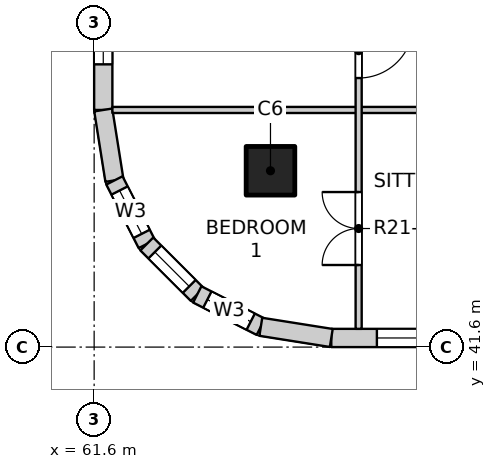
"""IFC4 building model, lengths in metres.
Left out: names, types, materials, properties, quantities, classifications, styles, units other than length and angle.
Written with IfcOpenShell. Run it as: python <this file> out.ifc"""

import sys

from ifc_helpers import new_model, si_unit, direction, frame, frame_2d, origin, origin_2d, place, context, subcontext, project, spatial, rectangle, extrude, element, fill, save


model = new_model("IFC4")
c1 = context("Model", 3, precision=1e-05, world=origin(), true_north=direction((0.0, 1.0)))
c2 = subcontext(c1, "Body", "Model", "MODEL_VIEW")
j1 = project(units=[si_unit("LENGTHUNIT", "METRE"), si_unit("PLANEANGLEUNIT", "RADIAN")], contexts=[c1])
p1 = place(None, origin())
s1 = spatial("IfcSite", under=j1, at=p1, CompositionType="ELEMENT")
p2 = place(p1, origin())
s2 = spatial("IfcBuilding", under=s1, at=p2, CompositionType="ELEMENT")
p3 = place(p2, frame((0.0, 0.0, 221.1)))
s3 = spatial("IfcBuildingStorey", under=s2, at=p3, CompositionType="ELEMENT", Elevation=221.1)
p4 = place(p3, frame((64.5, 44.5, -0.25), z_axis=(0.0, 0.0, 1.0), x_axis=(1.0, 0.0, 0.0)))
e1 = element("IfcColumn", 1, at=p4, inside=s3, PredefinedType="COLUMN", context=c2, shape_type="SweptSolid", body=[
    extrude(rectangle(XDim=0.8, YDim=0.8, at=origin_2d()), origin(), (0.0, 0.0, 1.0), 3.4),
])
p5 = place(p3, frame((65.5, 41.75, 0.0), z_axis=(0.0, 0.0, 1.0), x_axis=(1.0, 0.0, 0.0)))
e2 = element("IfcWall", 2, at=p5, inside=s3, PredefinedType="SOLIDWALL", context=c2, shape_type="SweptSolid", body=[
    extrude(rectangle(XDim=7.4, YDim=0.3, at=frame_2d((3.7, 0.0))), origin(), (0.0, 0.0, 1.0), 2.7),
])
p6 = place(p5, frame((0.75, 0.0, 0.9)))
e3 = element("IfcOpeningElement", 3, at=p6, cuts=e2, PredefinedType="OPENING", context=c2, shape_type="SweptSolid", body=[
    extrude(rectangle(XDim=2.4, YDim=1.8, at=frame_2d((1.2, 0.9))), frame((0.0, 0.16, 0.0), z_axis=(0.0, -1.0, 0.0), x_axis=(1.0, 0.0, 0.0)), (0.0, 0.0, 1.0), 0.32),
])
p7 = place(p5, frame((4.65, 0.0, 0.9)))
e4 = element("IfcOpeningElement", 4, at=p7, cuts=e2, PredefinedType="OPENING", context=c2, shape_type="SweptSolid", body=[
    extrude(rectangle(XDim=2.4, YDim=1.8, at=frame_2d((1.2, 0.9))), frame((0.0, 0.16, 0.0), z_axis=(0.0, -1.0, 0.0), x_axis=(1.0, 0.0, 0.0)), (0.0, 0.0, 1.0), 0.32),
])
p8 = place(p3, frame((61.75, 45.5, 0.0), z_axis=(0.0, 0.0, 1.0), x_axis=(0.0, 1.0, 0.0)))
e5 = element("IfcWall", 5, at=p8, inside=s3, PredefinedType="SOLIDWALL", context=c2, shape_type="SweptSolid", body=[
    extrude(rectangle(XDim=7.4, YDim=0.3, at=frame_2d((3.7, 0.0))), origin(), (0.0, 0.0, 1.0), 2.7),
])
p9 = place(p8, frame((0.75, 0.0, 0.9)))
e6 = element("IfcOpeningElement", 6, at=p9, cuts=e5, PredefinedType="OPENING", context=c2, shape_type="SweptSolid", body=[
    extrude(rectangle(XDim=2.4, YDim=1.8, at=frame_2d((1.2, 0.9))), frame((0.0, 0.16, 0.0), z_axis=(0.0, -1.0, 0.0), x_axis=(1.0, 0.0, 0.0)), (0.0, 0.0, 1.0), 0.32),
])
p10 = place(p8, frame((4.65, 0.0, 0.9)))
e7 = element("IfcOpeningElement", 7, at=p10, cuts=e5, PredefinedType="OPENING", context=c2, shape_type="SweptSolid", body=[
    extrude(rectangle(XDim=2.4, YDim=1.8, at=frame_2d((1.2, 0.9))), frame((0.0, 0.16, 0.0), z_axis=(0.0, -1.0, 0.0), x_axis=(1.0, 0.0, 0.0)), (0.0, 0.0, 1.0), 0.32),
])
p11 = place(p3, frame((61.75, 45.5, 0.0), z_axis=(0.0, 0.0, 1.0), x_axis=(0.156496880861, -0.987678452879, 0.0)))
e8 = element("IfcWall", 8, at=p11, inside=s3, PredefinedType="SOLIDWALL", context=c2, shape_type="SweptSolid", body=[
    extrude(rectangle(XDim=1.173, YDim=0.3, at=frame_2d((0.586, 0.0))), origin(), (0.0, 0.0, 1.0), 2.7),
])
p12 = place(p3, frame((61.934, 44.341, 0.0), z_axis=(0.0, 0.0, 1.0), x_axis=(0.454025524128, -0.890988677504, 0.0)))
e9 = element("IfcWall", 9, at=p12, inside=s3, PredefinedType="SOLIDWALL", context=c2, shape_type="SweptSolid", body=[
    extrude(rectangle(XDim=1.173, YDim=0.3, at=frame_2d((0.587, 0.0))), origin(), (0.0, 0.0, 1.0), 2.7),
])
p13 = place(p12, frame((0.187, 0.0, 0.9)))
e10 = element("IfcOpeningElement", 10, at=p13, cuts=e9, PredefinedType="OPENING", context=c2, shape_type="SweptSolid", body=[
    extrude(rectangle(XDim=0.8, YDim=1.2, at=frame_2d((0.4, 0.6))), frame((0.0, 0.16, 0.0), z_axis=(0.0, -1.0, 0.0), x_axis=(1.0, 0.0, 0.0)), (0.0, 0.0, 1.0), 0.32),
])
p14 = place(p3, frame((62.466, 43.296, 0.0), z_axis=(0.0, 0.0, 1.0), x_axis=(0.707106781187, -0.707106781187, 0.0)))
e11 = element("IfcWall", 11, at=p14, inside=s3, PredefinedType="SOLIDWALL", context=c2, shape_type="SweptSolid", body=[
    extrude(rectangle(XDim=1.173, YDim=0.3, at=frame_2d((0.586, 0.0))), origin(), (0.0, 0.0, 1.0), 2.7),
])
p15 = place(p14, frame((0.187, 0.0, 0.9)))
e12 = element("IfcOpeningElement", 12, at=p15, cuts=e11, PredefinedType="OPENING", context=c2, shape_type="SweptSolid", body=[
    extrude(rectangle(XDim=0.8, YDim=1.2, at=frame_2d((0.4, 0.6))), frame((0.0, 0.16, 0.0), z_axis=(0.0, -1.0, 0.0), x_axis=(1.0, 0.0, 0.0)), (0.0, 0.0, 1.0), 0.32),
])
p16 = place(p3, frame((63.296, 42.466, 0.0), z_axis=(0.0, 0.0, 1.0), x_axis=(0.890988677504, -0.454025524128, 0.0)))
e13 = element("IfcWall", 13, at=p16, inside=s3, PredefinedType="SOLIDWALL", context=c2, shape_type="SweptSolid", body=[
    extrude(rectangle(XDim=1.173, YDim=0.3, at=frame_2d((0.587, 0.0))), origin(), (0.0, 0.0, 1.0), 2.7),
])
p17 = place(p16, frame((0.187, 0.0, 0.9)))
e14 = element("IfcOpeningElement", 14, at=p17, cuts=e13, PredefinedType="OPENING", context=c2, shape_type="SweptSolid", body=[
    extrude(rectangle(XDim=0.8, YDim=1.2, at=frame_2d((0.4, 0.6))), frame((0.0, 0.16, 0.0), z_axis=(0.0, -1.0, 0.0), x_axis=(1.0, 0.0, 0.0)), (0.0, 0.0, 1.0), 0.32),
])
p18 = place(p3, frame((64.341, 41.934, 0.0), z_axis=(0.0, 0.0, 1.0), x_axis=(0.987678452879, -0.156496880861, 0.0)))
e15 = element("IfcWall", 15, at=p18, inside=s3, PredefinedType="SOLIDWALL", context=c2, shape_type="SweptSolid", body=[
    extrude(rectangle(XDim=1.173, YDim=0.3, at=frame_2d((0.586, 0.0))), origin(), (0.0, 0.0, 1.0), 2.7),
])
p19 = place(p3, frame((61.9, 45.5, 0.0), z_axis=(0.0, 0.0, 1.0), x_axis=(1.0, 0.0, 0.0)))
e16 = element("IfcWall", 16, at=p19, inside=s3, PredefinedType="PARTITIONING", context=c2, shape_type="SweptSolid", body=[
    extrude(rectangle(XDim=11.475, YDim=0.1, at=frame_2d((5.737, 0.0))), origin(), (0.0, 0.0, 1.0), 3.15),
])
p20 = place(p19, frame((7.965, 0.0, 0.0)))
e17 = element("IfcOpeningElement", 17, at=p20, cuts=e16, PredefinedType="OPENING", context=c2, shape_type="SweptSolid", body=[
    extrude(rectangle(XDim=0.9, YDim=2.1, at=frame_2d((0.45, 1.05))), frame((0.0, 0.06, 0.0), z_axis=(0.0, -1.0, 0.0), x_axis=(1.0, 0.0, 0.0)), (0.0, 0.0, 1.0), 0.12),
])
p21 = place(p3, frame((65.95, 41.9, 0.0), z_axis=(0.0, 0.0, 1.0), x_axis=(0.0, 1.0, 0.0)))
e18 = element("IfcWall", 18, at=p21, inside=s3, PredefinedType="PARTITIONING", context=c2, shape_type="SweptSolid", body=[
    extrude(rectangle(XDim=19.1, YDim=0.1, at=frame_2d((9.55, 0.0))), origin(), (0.0, 0.0, 1.0), 3.15),
])
p22 = place(p21, frame((1.05, 0.0, 0.0)))
e19 = element("IfcOpeningElement", 19, at=p22, cuts=e18, PredefinedType="OPENING", context=c2, shape_type="SweptSolid", body=[
    extrude(rectangle(XDim=1.2, YDim=2.1, at=frame_2d((0.6, 1.05))), frame((0.0, 0.06, 0.0), z_axis=(0.0, -1.0, 0.0), x_axis=(1.0, 0.0, 0.0)), (0.0, 0.0, 1.0), 0.12),
])
p23 = place(p21, frame((4.125, 0.0, 0.0)))
e20 = element("IfcOpeningElement", 20, at=p23, cuts=e18, PredefinedType="OPENING", context=c2, shape_type="SweptSolid", body=[
    extrude(rectangle(XDim=0.9, YDim=2.1, at=frame_2d((0.45, 1.05))), frame((0.0, 0.06, 0.0), z_axis=(0.0, -1.0, 0.0), x_axis=(1.0, 0.0, 0.0)), (0.0, 0.0, 1.0), 0.12),
])
p24 = place(p21, frame((6.075, 0.0, 0.0)))
e21 = element("IfcOpeningElement", 21, at=p24, cuts=e18, PredefinedType="OPENING", context=c2, shape_type="SweptSolid", body=[
    extrude(rectangle(XDim=0.9, YDim=2.1, at=frame_2d((0.45, 1.05))), frame((0.0, 0.06, 0.0), z_axis=(0.0, -1.0, 0.0), x_axis=(1.0, 0.0, 0.0)), (0.0, 0.0, 1.0), 0.12),
])
p25 = place(p21, frame((8.85, 0.0, 0.0)))
e22 = element("IfcOpeningElement", 22, at=p25, cuts=e18, PredefinedType="OPENING", context=c2, shape_type="SweptSolid", body=[
    extrude(rectangle(XDim=1.2, YDim=2.1, at=frame_2d((0.6, 1.05))), frame((0.0, 0.06, 0.0), z_axis=(0.0, -1.0, 0.0), x_axis=(1.0, 0.0, 0.0)), (0.0, 0.0, 1.0), 0.12),
])
p26 = place(p21, frame((12.75, 0.0, 0.0)))
e23 = element("IfcOpeningElement", 23, at=p26, cuts=e18, PredefinedType="OPENING", context=c2, shape_type="SweptSolid", body=[
    extrude(rectangle(XDim=1.2, YDim=2.1, at=frame_2d((0.6, 1.05))), frame((0.0, 0.06, 0.0), z_axis=(0.0, -1.0, 0.0), x_axis=(1.0, 0.0, 0.0)), (0.0, 0.0, 1.0), 0.12),
])
p27 = place(p21, frame((15.825, 0.0, 0.0)))
e24 = element("IfcOpeningElement", 24, at=p27, cuts=e18, PredefinedType="OPENING", context=c2, shape_type="SweptSolid", body=[
    extrude(rectangle(XDim=0.9, YDim=2.1, at=frame_2d((0.45, 1.05))), frame((0.0, 0.06, 0.0), z_axis=(0.0, -1.0, 0.0), x_axis=(1.0, 0.0, 0.0)), (0.0, 0.0, 1.0), 0.12),
])
p28 = place(p21, frame((17.775, 0.0, 0.0)))
e25 = element("IfcOpeningElement", 25, at=p28, cuts=e18, PredefinedType="OPENING", context=c2, shape_type="SweptSolid", body=[
    extrude(rectangle(XDim=0.9, YDim=2.1, at=frame_2d((0.45, 1.05))), frame((0.0, 0.06, 0.0), z_axis=(0.0, -1.0, 0.0), x_axis=(1.0, 0.0, 0.0)), (0.0, 0.0, 1.0), 0.12),
])
p29 = place(p6, origin())
e26 = element("IfcWindow", 26, at=p29, inside=s3, PartitioningType="DOUBLE_PANEL_VERTICAL", PredefinedType="WINDOW", context=c2, shape_type="SweptSolid", body=[
    extrude(rectangle(XDim=2.4, YDim=1.8, at=frame_2d((1.2, 0.9))), frame((0.0, 0.03, 0.0), z_axis=(0.0, -1.0, 0.0), x_axis=(1.0, 0.0, 0.0)), (0.0, 0.0, 1.0), 0.06),
])
fill(e3, e26)
p30 = place(p9, origin())
e27 = element("IfcWindow", 27, at=p30, inside=s3, PartitioningType="DOUBLE_PANEL_VERTICAL", PredefinedType="WINDOW", context=c2, shape_type="SweptSolid", body=[
    extrude(rectangle(XDim=2.4, YDim=1.8, at=frame_2d((1.2, 0.9))), frame((0.0, 0.03, 0.0), z_axis=(0.0, -1.0, 0.0), x_axis=(1.0, 0.0, 0.0)), (0.0, 0.0, 1.0), 0.06),
])
fill(e6, e27)
p31 = place(p13, origin())
e28 = element("IfcWindow", 28, at=p31, inside=s3, PartitioningType="SINGLE_PANEL", PredefinedType="WINDOW", context=c2, shape_type="SweptSolid", body=[
    extrude(rectangle(XDim=0.8, YDim=1.2, at=frame_2d((0.4, 0.6))), frame((0.0, 0.03, 0.0), z_axis=(0.0, -1.0, 0.0), x_axis=(1.0, 0.0, 0.0)), (0.0, 0.0, 1.0), 0.06),
])
fill(e10, e28)
p32 = place(p15, origin())
e29 = element("IfcWindow", 29, at=p32, inside=s3, PartitioningType="SINGLE_PANEL", PredefinedType="WINDOW", context=c2, shape_type="SweptSolid", body=[
    extrude(rectangle(XDim=0.8, YDim=1.2, at=frame_2d((0.4, 0.6))), frame((0.0, 0.03, 0.0), z_axis=(0.0, -1.0, 0.0), x_axis=(1.0, 0.0, 0.0)), (0.0, 0.0, 1.0), 0.06),
])
fill(e12, e29)
p33 = place(p17, origin())
e30 = element("IfcWindow", 30, at=p33, inside=s3, PartitioningType="SINGLE_PANEL", PredefinedType="WINDOW", context=c2, shape_type="SweptSolid", body=[
    extrude(rectangle(XDim=0.8, YDim=1.2, at=frame_2d((0.4, 0.6))), frame((0.0, 0.03, 0.0), z_axis=(0.0, -1.0, 0.0), x_axis=(1.0, 0.0, 0.0)), (0.0, 0.0, 1.0), 0.06),
])
fill(e14, e30)
p34 = place(p22, origin())
e31 = element("IfcDoor", 31, at=p34, inside=s3, OperationType="DOUBLE_DOOR_SINGLE_SWING", PredefinedType="DOOR", context=c2, shape_type="SweptSolid", body=[
    extrude(rectangle(XDim=1.2, YDim=2.1, at=frame_2d((0.6, 1.05))), frame((0.0, 0.025, 0.0), z_axis=(0.0, -1.0, 0.0), x_axis=(1.0, 0.0, 0.0)), (0.0, 0.0, 1.0), 0.05),
])
fill(e19, e31)
p35 = place(p23, origin())
e32 = element("IfcDoor", 32, at=p35, inside=s3, OperationType="SINGLE_SWING_LEFT", PredefinedType="DOOR", context=c2, shape_type="SweptSolid", body=[
    extrude(rectangle(XDim=0.9, YDim=2.1, at=frame_2d((0.45, 1.05))), frame((0.0, 0.025, 0.0), z_axis=(0.0, -1.0, 0.0), x_axis=(1.0, 0.0, 0.0)), (0.0, 0.0, 1.0), 0.05),
])
fill(e20, e32)
save(model, sys.argv[1])
